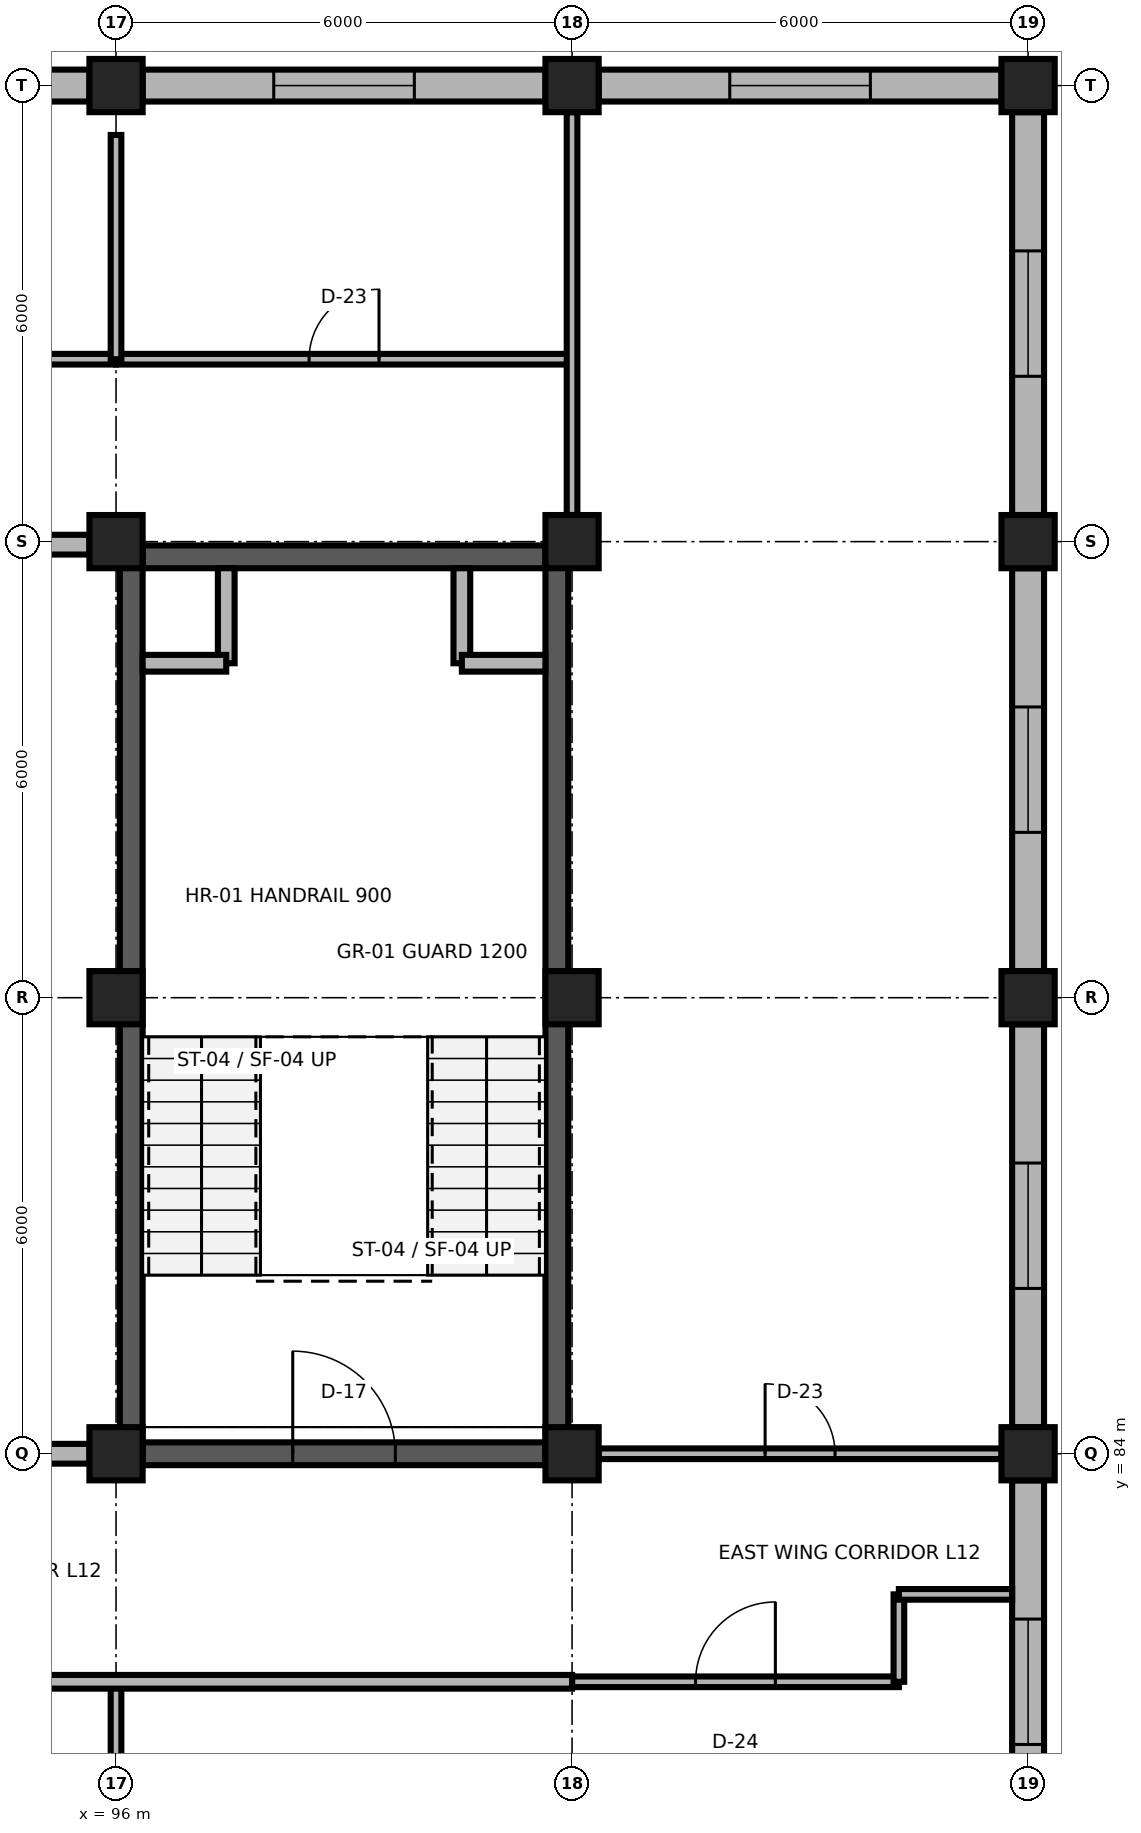
"""IFC4 building model, lengths in metres.
Left out: names, types, materials, properties, quantities, classifications, styles, units other than length and angle.
Written with IfcOpenShell. Run it as: python <this file> out.ifc"""

import sys

from ifc_helpers import new_model, si_unit, direction, frame, frame_2d, origin, origin_2d, place, context, subcontext, project, spatial, rectangle, extrude, element, fill, save


model = new_model("IFC4")
c1 = context("Model", 3, precision=1e-05, world=origin(), true_north=direction((0.0, 1.0)))
c2 = subcontext(c1, "Body", "Model", "MODEL_VIEW")
j1 = project(units=[si_unit("LENGTHUNIT", "METRE"), si_unit("PLANEANGLEUNIT", "RADIAN")], contexts=[c1])
p1 = place(None, origin())
s1 = spatial("IfcSite", under=j1, at=p1, CompositionType="ELEMENT")
p2 = place(p1, origin())
s2 = spatial("IfcBuilding", under=s1, at=p2, CompositionType="ELEMENT")
p3 = place(p2, frame((0.0, 0.0, 48.3)))
s3 = spatial("IfcBuildingStorey", under=s2, at=p3, CompositionType="ELEMENT", Elevation=48.3)
for number, where, z_axis, x_axis in (
    (1, (96.0, 84.0, 0.0), (0.0, 0.0, 1.0), (1.0, 0.0, 0.0)),
    (2, (102.0, 84.0, 0.0), (0.0, 0.0, 1.0), (1.0, 0.0, 0.0)),
    (3, (108.0, 84.0, 0.0), (0.0, 0.0, 1.0), (1.0, 0.0, 0.0)),
    (4, (96.0, 90.0, 0.0), (0.0, 0.0, 1.0), (1.0, 0.0, 0.0)),
    (5, (102.0, 90.0, 0.0), (0.0, 0.0, 1.0), (1.0, 0.0, 0.0)),
    (6, (108.0, 90.0, 0.0), (0.0, 0.0, 1.0), (1.0, 0.0, 0.0)),
    (7, (96.0, 96.0, 0.0), (0.0, 0.0, 1.0), (1.0, 0.0, 0.0)),
    (8, (102.0, 96.0, 0.0), (0.0, 0.0, 1.0), (1.0, 0.0, 0.0)),
    (9, (108.0, 96.0, 0.0), (0.0, 0.0, 1.0), (1.0, 0.0, 0.0)),
    (10, (96.0, 102.0, 0.0), (0.0, 0.0, 1.0), (1.0, 0.0, 0.0)),
    (11, (102.0, 102.0, 0.0), (0.0, 0.0, 1.0), (1.0, 0.0, 0.0)),
    (12, (108.0, 102.0, 0.0), (0.0, 0.0, 1.0), (1.0, 0.0, 0.0)),
):
    element("IfcColumn", number, at=place(p3, frame(where, z_axis=z_axis, x_axis=x_axis)), inside=s3, PredefinedType="COLUMN", context=c2, shape_type="SweptSolid", body=[
        extrude(rectangle(XDim=0.7, YDim=0.7, at=origin_2d()), origin(), (0.0, 0.0, 1.0), 3.9),
    ])
p4 = place(p3, frame((90.35, 102.0, 0.0), z_axis=(0.0, 0.0, 1.0), x_axis=(1.0, 0.0, 0.0)))
e13 = element("IfcWall", 13, at=p4, inside=s3, PredefinedType="SOLIDWALL", context=c2, shape_type="SweptSolid", body=[
    extrude(rectangle(XDim=5.3, YDim=0.42, at=frame_2d((2.65, 0.0))), origin(), (0.0, 0.0, 1.0), 3.26),
])
p5 = place(p4, frame((1.725, 0.0, 0.85)))
e14 = element("IfcOpeningElement", 14, at=p5, cuts=e13, PredefinedType="OPENING", context=c2, shape_type="SweptSolid", body=[
    extrude(rectangle(XDim=1.85, YDim=2.0, at=frame_2d((0.925, 1.0))), frame((0.0, 0.225, 0.0), z_axis=(0.0, -1.0, 0.0), x_axis=(1.0, 0.0, 0.0)), (0.0, 0.0, 1.0), 0.45),
])
p6 = place(p3, frame((96.35, 102.0, 0.0), z_axis=(0.0, 0.0, 1.0), x_axis=(1.0, 0.0, 0.0)))
e15 = element("IfcWall", 15, at=p6, inside=s3, PredefinedType="SOLIDWALL", context=c2, shape_type="SweptSolid", body=[
    extrude(rectangle(XDim=5.3, YDim=0.42, at=frame_2d((2.65, 0.0))), origin(), (0.0, 0.0, 1.0), 3.26),
])
p7 = place(p6, frame((1.725, 0.0, 0.85)))
e16 = element("IfcOpeningElement", 16, at=p7, cuts=e15, PredefinedType="OPENING", context=c2, shape_type="SweptSolid", body=[
    extrude(rectangle(XDim=1.85, YDim=2.0, at=frame_2d((0.925, 1.0))), frame((0.0, 0.225, 0.0), z_axis=(0.0, -1.0, 0.0), x_axis=(1.0, 0.0, 0.0)), (0.0, 0.0, 1.0), 0.45),
])
p8 = place(p3, frame((102.35, 102.0, 0.0), z_axis=(0.0, 0.0, 1.0), x_axis=(1.0, 0.0, 0.0)))
e17 = element("IfcWall", 17, at=p8, inside=s3, PredefinedType="SOLIDWALL", context=c2, shape_type="SweptSolid", body=[
    extrude(rectangle(XDim=5.3, YDim=0.42, at=frame_2d((2.65, 0.0))), origin(), (0.0, 0.0, 1.0), 3.26),
])
p9 = place(p8, frame((1.725, 0.0, 0.85)))
e18 = element("IfcOpeningElement", 18, at=p9, cuts=e17, PredefinedType="OPENING", context=c2, shape_type="SweptSolid", body=[
    extrude(rectangle(XDim=1.85, YDim=2.0, at=frame_2d((0.925, 1.0))), frame((0.0, 0.225, 0.0), z_axis=(0.0, -1.0, 0.0), x_axis=(1.0, 0.0, 0.0)), (0.0, 0.0, 1.0), 0.45),
])
p10 = place(p3, frame((108.0, 78.35, 0.0), z_axis=(0.0, 0.0, 1.0), x_axis=(0.0, 1.0, 0.0)))
e19 = element("IfcWall", 19, at=p10, inside=s3, PredefinedType="SOLIDWALL", context=c2, shape_type="SweptSolid", body=[
    extrude(rectangle(XDim=5.3, YDim=0.42, at=frame_2d((2.65, 0.0))), origin(), (0.0, 0.0, 1.0), 3.26),
])
p11 = place(p10, frame((1.825, 0.0, 0.85)))
e20 = element("IfcOpeningElement", 20, at=p11, cuts=e19, PredefinedType="OPENING", context=c2, shape_type="SweptSolid", body=[
    extrude(rectangle(XDim=1.65, YDim=1.95, at=frame_2d((0.825, 0.975))), frame((0.0, 0.225, 0.0), z_axis=(0.0, -1.0, 0.0), x_axis=(1.0, 0.0, 0.0)), (0.0, 0.0, 1.0), 0.45),
])
p12 = place(p3, frame((108.0, 84.35, 0.0), z_axis=(0.0, 0.0, 1.0), x_axis=(0.0, 1.0, 0.0)))
e21 = element("IfcWall", 21, at=p12, inside=s3, PredefinedType="SOLIDWALL", context=c2, shape_type="SweptSolid", body=[
    extrude(rectangle(XDim=5.3, YDim=0.42, at=frame_2d((2.65, 0.0))), origin(), (0.0, 0.0, 1.0), 3.26),
])
p13 = place(p12, frame((1.825, 0.0, 0.85)))
e22 = element("IfcOpeningElement", 22, at=p13, cuts=e21, PredefinedType="OPENING", context=c2, shape_type="SweptSolid", body=[
    extrude(rectangle(XDim=1.65, YDim=1.95, at=frame_2d((0.825, 0.975))), frame((0.0, 0.225, 0.0), z_axis=(0.0, -1.0, 0.0), x_axis=(1.0, 0.0, 0.0)), (0.0, 0.0, 1.0), 0.45),
])
p14 = place(p3, frame((108.0, 90.35, 0.0), z_axis=(0.0, 0.0, 1.0), x_axis=(0.0, 1.0, 0.0)))
e23 = element("IfcWall", 23, at=p14, inside=s3, PredefinedType="SOLIDWALL", context=c2, shape_type="SweptSolid", body=[
    extrude(rectangle(XDim=5.3, YDim=0.42, at=frame_2d((2.65, 0.0))), origin(), (0.0, 0.0, 1.0), 3.26),
])
p15 = place(p14, frame((1.825, 0.0, 0.85)))
e24 = element("IfcOpeningElement", 24, at=p15, cuts=e23, PredefinedType="OPENING", context=c2, shape_type="SweptSolid", body=[
    extrude(rectangle(XDim=1.65, YDim=1.95, at=frame_2d((0.825, 0.975))), frame((0.0, 0.225, 0.0), z_axis=(0.0, -1.0, 0.0), x_axis=(1.0, 0.0, 0.0)), (0.0, 0.0, 1.0), 0.45),
])
p16 = place(p3, frame((108.0, 96.35, 0.0), z_axis=(0.0, 0.0, 1.0), x_axis=(0.0, 1.0, 0.0)))
e25 = element("IfcWall", 25, at=p16, inside=s3, PredefinedType="SOLIDWALL", context=c2, shape_type="SweptSolid", body=[
    extrude(rectangle(XDim=5.3, YDim=0.42, at=frame_2d((2.65, 0.0))), origin(), (0.0, 0.0, 1.0), 3.26),
])
p17 = place(p16, frame((1.825, 0.0, 0.85)))
e26 = element("IfcOpeningElement", 26, at=p17, cuts=e25, PredefinedType="OPENING", context=c2, shape_type="SweptSolid", body=[
    extrude(rectangle(XDim=1.65, YDim=1.95, at=frame_2d((0.825, 0.975))), frame((0.0, 0.225, 0.0), z_axis=(0.0, -1.0, 0.0), x_axis=(1.0, 0.0, 0.0)), (0.0, 0.0, 1.0), 0.45),
])
p18 = place(p3, frame((96.35, 84.0, 0.0), z_axis=(0.0, 0.0, 1.0), x_axis=(1.0, 0.0, 0.0)))
e27 = element("IfcWall", 27, at=p18, inside=s3, PredefinedType="SHEAR", context=c2, shape_type="SweptSolid", body=[
    extrude(rectangle(XDim=5.3, YDim=0.3, at=frame_2d((2.65, 0.0))), origin(), (0.0, 0.0, 1.0), 3.66),
])
p19 = place(p18, frame((1.975, 0.0, 0.0)))
e28 = element("IfcOpeningElement", 28, at=p19, cuts=e27, PredefinedType="OPENING", context=c2, shape_type="SweptSolid", body=[
    extrude(rectangle(XDim=1.35, YDim=2.2, at=frame_2d((0.675, 1.1))), frame((0.0, 0.165, 0.0), z_axis=(0.0, -1.0, 0.0), x_axis=(1.0, 0.0, 0.0)), (0.0, 0.0, 1.0), 0.33),
])
p20 = place(p3, frame((96.35, 95.8, 0.0), z_axis=(0.0, 0.0, 1.0), x_axis=(1.0, 0.0, 0.0)))
e29 = element("IfcWall", 29, at=p20, inside=s3, PredefinedType="SHEAR", context=c2, shape_type="SweptSolid", body=[
    extrude(rectangle(XDim=5.3, YDim=0.3, at=frame_2d((2.65, 0.0))), origin(), (0.0, 0.0, 1.0), 3.74),
])
for number, where, z_axis, x_axis in (
    (30, (96.2, 84.0, 0.0), (0.0, 0.0, 1.0), (0.0, 1.0, 0.0)),
    (31, (101.8, 84.0, 0.0), (0.0, 0.0, 1.0), (0.0, 1.0, 0.0)),
):
    element("IfcWall", number, at=place(p3, frame(where, z_axis=z_axis, x_axis=x_axis)), inside=s3, PredefinedType="SHEAR", context=c2, shape_type="SweptSolid", body=[
        extrude(rectangle(XDim=11.8, YDim=0.3, at=frame_2d((5.9, 0.0))), origin(), (0.0, 0.0, 1.0), 3.74),
    ])
p21 = place(p3, frame((97.45, 94.4, 0.0), z_axis=(0.0, 0.0, 1.0), x_axis=(0.0, 1.0, 0.0)))
e32 = element("IfcWall", 32, at=p21, inside=s3, PredefinedType="PARTITIONING", context=c2, shape_type="SweptSolid", body=[
    extrude(rectangle(XDim=1.25, YDim=0.22, at=frame_2d((0.625, 0.0))), origin(), (0.0, 0.0, 1.0), 3.74),
])
p22 = place(p3, frame((96.35, 94.4, 0.0), z_axis=(0.0, 0.0, 1.0), x_axis=(1.0, 0.0, 0.0)))
e33 = element("IfcWall", 33, at=p22, inside=s3, PredefinedType="PARTITIONING", context=c2, shape_type="SweptSolid", body=[
    extrude(rectangle(XDim=1.1, YDim=0.22, at=frame_2d((0.55, 0.0))), origin(), (0.0, 0.0, 1.0), 3.74),
])
p23 = place(p3, frame((100.55, 94.4, 0.0), z_axis=(0.0, 0.0, 1.0), x_axis=(0.0, 1.0, 0.0)))
e34 = element("IfcWall", 34, at=p23, inside=s3, PredefinedType="PARTITIONING", context=c2, shape_type="SweptSolid", body=[
    extrude(rectangle(XDim=1.25, YDim=0.22, at=frame_2d((0.625, 0.0))), origin(), (0.0, 0.0, 1.0), 3.74),
])
p24 = place(p3, frame((100.55, 94.4, 0.0), z_axis=(0.0, 0.0, 1.0), x_axis=(1.0, 0.0, 0.0)))
e35 = element("IfcWall", 35, at=p24, inside=s3, PredefinedType="PARTITIONING", context=c2, shape_type="SweptSolid", body=[
    extrude(rectangle(XDim=1.1, YDim=0.22, at=frame_2d((0.55, 0.0))), origin(), (0.0, 0.0, 1.0), 3.74),
])
for number, where, z_axis, x_axis in (
    (36, (93.4, 84.0, 0.0), (0.0, 0.0, 1.0), (1.0, 0.0, 0.0)),
    (37, (93.4, 95.96, 0.0), (0.0, 0.0, 1.0), (1.0, 0.0, 0.0)),
):
    element("IfcWall", number, at=place(p3, frame(where, z_axis=z_axis, x_axis=x_axis)), inside=s3, PredefinedType="PARTITIONING", context=c2, shape_type="SweptSolid", body=[
        extrude(rectangle(XDim=2.25, YDim=0.26, at=frame_2d((1.125, 0.0))), origin(), (0.0, 0.0, 1.0), 3.288),
    ])
p25 = place(p3, frame((102.0, 81.0, 0.0), z_axis=(0.0, 0.0, 1.0), x_axis=(1.0, 0.0, 0.0)))
e38 = element("IfcWall", 38, at=p25, inside=s3, PredefinedType="PARTITIONING", context=c2, shape_type="SweptSolid", body=[
    extrude(rectangle(XDim=4.3, YDim=0.14, at=frame_2d((2.15, 0.0))), origin(), (0.0, 0.0, 1.0), 3.68),
])
p26 = place(p25, frame((1.625, 0.0, 0.0)))
e39 = element("IfcOpeningElement", 39, at=p26, cuts=e38, PredefinedType="OPENING", context=c2, shape_type="SweptSolid", body=[
    extrude(rectangle(XDim=1.05, YDim=2.25, at=frame_2d((0.525, 1.125))), frame((0.0, 0.085, 0.0), z_axis=(0.0, -1.0, 0.0), x_axis=(1.0, 0.0, 0.0)), (0.0, 0.0, 1.0), 0.17),
])
p27 = place(p3, frame((102.35, 84.0, 0.0), z_axis=(0.0, 0.0, 1.0), x_axis=(1.0, 0.0, 0.0)))
e40 = element("IfcWall", 40, at=p27, inside=s3, PredefinedType="PARTITIONING", context=c2, shape_type="SweptSolid", body=[
    extrude(rectangle(XDim=5.3, YDim=0.14, at=frame_2d((2.65, 0.0))), origin(), (0.0, 0.0, 1.0), 3.288),
])
p28 = place(p27, frame((2.19, 0.0, 0.0)))
e41 = element("IfcOpeningElement", 41, at=p28, cuts=e40, PredefinedType="OPENING", context=c2, shape_type="SweptSolid", body=[
    extrude(rectangle(XDim=0.92, YDim=2.15, at=frame_2d((0.46, 1.075))), frame((0.0, 0.085, 0.0), z_axis=(0.0, -1.0, 0.0), x_axis=(1.0, 0.0, 0.0)), (0.0, 0.0, 1.0), 0.17),
])
p29 = place(p3, frame((90.0, 98.4, 0.0), z_axis=(0.0, 0.0, 1.0), x_axis=(1.0, 0.0, 0.0)))
e42 = element("IfcWall", 42, at=p29, inside=s3, PredefinedType="PARTITIONING", context=c2, shape_type="SweptSolid", body=[
    extrude(rectangle(XDim=6.0, YDim=0.14, at=frame_2d((3.0, 0.0))), origin(), (0.0, 0.0, 1.0), 3.68),
])
p30 = place(p29, frame((2.54, 0.0, 0.0)))
e43 = element("IfcOpeningElement", 43, at=p30, cuts=e42, PredefinedType="OPENING", context=c2, shape_type="SweptSolid", body=[
    extrude(rectangle(XDim=0.92, YDim=2.15, at=frame_2d((0.46, 1.075))), frame((0.0, 0.085, 0.0), z_axis=(0.0, -1.0, 0.0), x_axis=(1.0, 0.0, 0.0)), (0.0, 0.0, 1.0), 0.17),
])
p31 = place(p3, frame((96.0, 98.4, 0.0), z_axis=(0.0, 0.0, 1.0), x_axis=(1.0, 0.0, 0.0)))
e44 = element("IfcWall", 44, at=p31, inside=s3, PredefinedType="PARTITIONING", context=c2, shape_type="SweptSolid", body=[
    extrude(rectangle(XDim=6.0, YDim=0.14, at=frame_2d((3.0, 0.0))), origin(), (0.0, 0.0, 1.0), 3.68),
])
p32 = place(p31, frame((2.54, 0.0, 0.0)))
e45 = element("IfcOpeningElement", 45, at=p32, cuts=e44, PredefinedType="OPENING", context=c2, shape_type="SweptSolid", body=[
    extrude(rectangle(XDim=0.92, YDim=2.15, at=frame_2d((0.46, 1.075))), frame((0.0, 0.085, 0.0), z_axis=(0.0, -1.0, 0.0), x_axis=(1.0, 0.0, 0.0)), (0.0, 0.0, 1.0), 0.17),
])
p33 = place(p3, frame((96.0, 72.65, 0.0), z_axis=(0.0, 0.0, 1.0), x_axis=(0.0, 1.0, 0.0)))
e46 = element("IfcWall", 46, at=p33, inside=s3, PredefinedType="PARTITIONING", context=c2, shape_type="SweptSolid", body=[
    extrude(rectangle(XDim=8.35, YDim=0.14, at=frame_2d((4.175, 0.0))), origin(), (0.0, 0.0, 1.0), 3.288),
])
p34 = place(p3, frame((96.0, 98.4, 0.0), z_axis=(0.0, 0.0, 1.0), x_axis=(0.0, 1.0, 0.0)))
e47 = element("IfcWall", 47, at=p34, inside=s3, PredefinedType="PARTITIONING", context=c2, shape_type="SweptSolid", body=[
    extrude(rectangle(XDim=2.95, YDim=0.14, at=frame_2d((1.475, 0.0))), origin(), (0.0, 0.0, 1.0), 3.288),
])
p35 = place(p3, frame((90.0, 81.0, 0.0), z_axis=(0.0, 0.0, 1.0), x_axis=(1.0, 0.0, 0.0)))
e48 = element("IfcWall", 48, at=p35, inside=s3, PredefinedType="PARTITIONING", context=c2, shape_type="SweptSolid", body=[
    extrude(rectangle(XDim=12.0, YDim=0.18, at=frame_2d((6.0, 0.0))), origin(), (0.0, 0.0, 1.0), 3.68),
])
p36 = place(p3, frame((106.3, 81.0, 0.0), z_axis=(0.0, 0.0, 1.0), x_axis=(0.0, 1.0, 0.0)))
e49 = element("IfcWall", 49, at=p36, inside=s3, PredefinedType="PARTITIONING", context=c2, shape_type="SweptSolid", body=[
    extrude(rectangle(XDim=1.15, YDim=0.14, at=frame_2d((0.575, 0.0))), origin(), (0.0, 0.0, 1.0), 3.68),
])
p37 = place(p3, frame((106.3, 82.15, 0.0), z_axis=(0.0, 0.0, 1.0), x_axis=(1.0, 0.0, 0.0)))
e50 = element("IfcWall", 50, at=p37, inside=s3, PredefinedType="PARTITIONING", context=c2, shape_type="SweptSolid", body=[
    extrude(rectangle(XDim=1.49, YDim=0.14, at=frame_2d((0.745, 0.0))), origin(), (0.0, 0.0, 1.0), 3.68),
])
p38 = place(p3, frame((102.0, 96.35, 0.0), z_axis=(0.0, 0.0, 1.0), x_axis=(0.0, 1.0, 0.0)))
e51 = element("IfcWall", 51, at=p38, inside=s3, PredefinedType="PARTITIONING", context=c2, shape_type="SweptSolid", body=[
    extrude(rectangle(XDim=5.3, YDim=0.14, at=frame_2d((2.65, 0.0))), origin(), (0.0, 0.0, 1.0), 3.288),
])
p39 = place(p7, origin())
e52 = element("IfcWindow", 52, at=p39, inside=s3, PartitioningType="SINGLE_PANEL", PredefinedType="WINDOW", context=c2, shape_type="SweptSolid", body=[
    extrude(rectangle(XDim=1.85, YDim=2.0, at=frame_2d((0.925, 1.0))), frame((0.0, 0.03, 0.0), z_axis=(0.0, -1.0, 0.0), x_axis=(1.0, 0.0, 0.0)), (0.0, 0.0, 1.0), 0.06),
])
fill(e16, e52)
p40 = place(p9, origin())
e53 = element("IfcWindow", 53, at=p40, inside=s3, PartitioningType="SINGLE_PANEL", PredefinedType="WINDOW", context=c2, shape_type="SweptSolid", body=[
    extrude(rectangle(XDim=1.85, YDim=2.0, at=frame_2d((0.925, 1.0))), frame((0.0, 0.03, 0.0), z_axis=(0.0, -1.0, 0.0), x_axis=(1.0, 0.0, 0.0)), (0.0, 0.0, 1.0), 0.06),
])
fill(e18, e53)
p41 = place(p11, origin())
e54 = element("IfcWindow", 54, at=p41, inside=s3, PartitioningType="SINGLE_PANEL", PredefinedType="WINDOW", context=c2, shape_type="SweptSolid", body=[
    extrude(rectangle(XDim=1.65, YDim=1.95, at=frame_2d((0.825, 0.975))), frame((0.0, 0.03, 0.0), z_axis=(0.0, -1.0, 0.0), x_axis=(1.0, 0.0, 0.0)), (0.0, 0.0, 1.0), 0.06),
])
fill(e20, e54)
p42 = place(p13, origin())
e55 = element("IfcWindow", 55, at=p42, inside=s3, PartitioningType="SINGLE_PANEL", PredefinedType="WINDOW", context=c2, shape_type="SweptSolid", body=[
    extrude(rectangle(XDim=1.65, YDim=1.95, at=frame_2d((0.825, 0.975))), frame((0.0, 0.03, 0.0), z_axis=(0.0, -1.0, 0.0), x_axis=(1.0, 0.0, 0.0)), (0.0, 0.0, 1.0), 0.06),
])
fill(e22, e55)
p43 = place(p15, origin())
e56 = element("IfcWindow", 56, at=p43, inside=s3, PartitioningType="SINGLE_PANEL", PredefinedType="WINDOW", context=c2, shape_type="SweptSolid", body=[
    extrude(rectangle(XDim=1.65, YDim=1.95, at=frame_2d((0.825, 0.975))), frame((0.0, 0.03, 0.0), z_axis=(0.0, -1.0, 0.0), x_axis=(1.0, 0.0, 0.0)), (0.0, 0.0, 1.0), 0.06),
])
fill(e24, e56)
p44 = place(p17, origin())
e57 = element("IfcWindow", 57, at=p44, inside=s3, PartitioningType="SINGLE_PANEL", PredefinedType="WINDOW", context=c2, shape_type="SweptSolid", body=[
    extrude(rectangle(XDim=1.65, YDim=1.95, at=frame_2d((0.825, 0.975))), frame((0.0, 0.03, 0.0), z_axis=(0.0, -1.0, 0.0), x_axis=(1.0, 0.0, 0.0)), (0.0, 0.0, 1.0), 0.06),
])
fill(e26, e57)
p45 = place(p19, origin())
e58 = element("IfcDoor", 58, at=p45, inside=s3, OperationType="SINGLE_SWING_LEFT", PredefinedType="DOOR", context=c2, shape_type="SweptSolid", body=[
    extrude(rectangle(XDim=1.35, YDim=2.2, at=frame_2d((0.675, 1.1))), frame((0.0, 0.025, 0.0), z_axis=(0.0, -1.0, 0.0), x_axis=(1.0, 0.0, 0.0)), (0.0, 0.0, 1.0), 0.05),
])
fill(e28, e58)
p46 = place(p26, origin())
e59 = element("IfcDoor", 59, at=p46, inside=s3, OperationType="SINGLE_SWING_RIGHT", PredefinedType="DOOR", context=c2, shape_type="SweptSolid", body=[
    extrude(rectangle(XDim=1.05, YDim=2.25, at=frame_2d((0.525, 1.125))), frame((0.0, 0.025, 0.0), z_axis=(0.0, -1.0, 0.0), x_axis=(1.0, 0.0, 0.0)), (0.0, 0.0, 1.0), 0.05),
])
fill(e39, e59)
p47 = place(p28, origin())
e60 = element("IfcDoor", 60, at=p47, inside=s3, OperationType="SINGLE_SWING_LEFT", PredefinedType="DOOR", context=c2, shape_type="SweptSolid", body=[
    extrude(rectangle(XDim=0.92, YDim=2.15, at=frame_2d((0.46, 1.075))), frame((0.0, 0.025, 0.0), z_axis=(0.0, -1.0, 0.0), x_axis=(1.0, 0.0, 0.0)), (0.0, 0.0, 1.0), 0.05),
])
fill(e41, e60)
p48 = place(p32, origin())
e61 = element("IfcDoor", 61, at=p48, inside=s3, OperationType="SINGLE_SWING_RIGHT", PredefinedType="DOOR", context=c2, shape_type="SweptSolid", body=[
    extrude(rectangle(XDim=0.92, YDim=2.15, at=frame_2d((0.46, 1.075))), frame((0.0, 0.025, 0.0), z_axis=(0.0, -1.0, 0.0), x_axis=(1.0, 0.0, 0.0)), (0.0, 0.0, 1.0), 0.05),
])
fill(e45, e61)
save(model, sys.argv[1])
